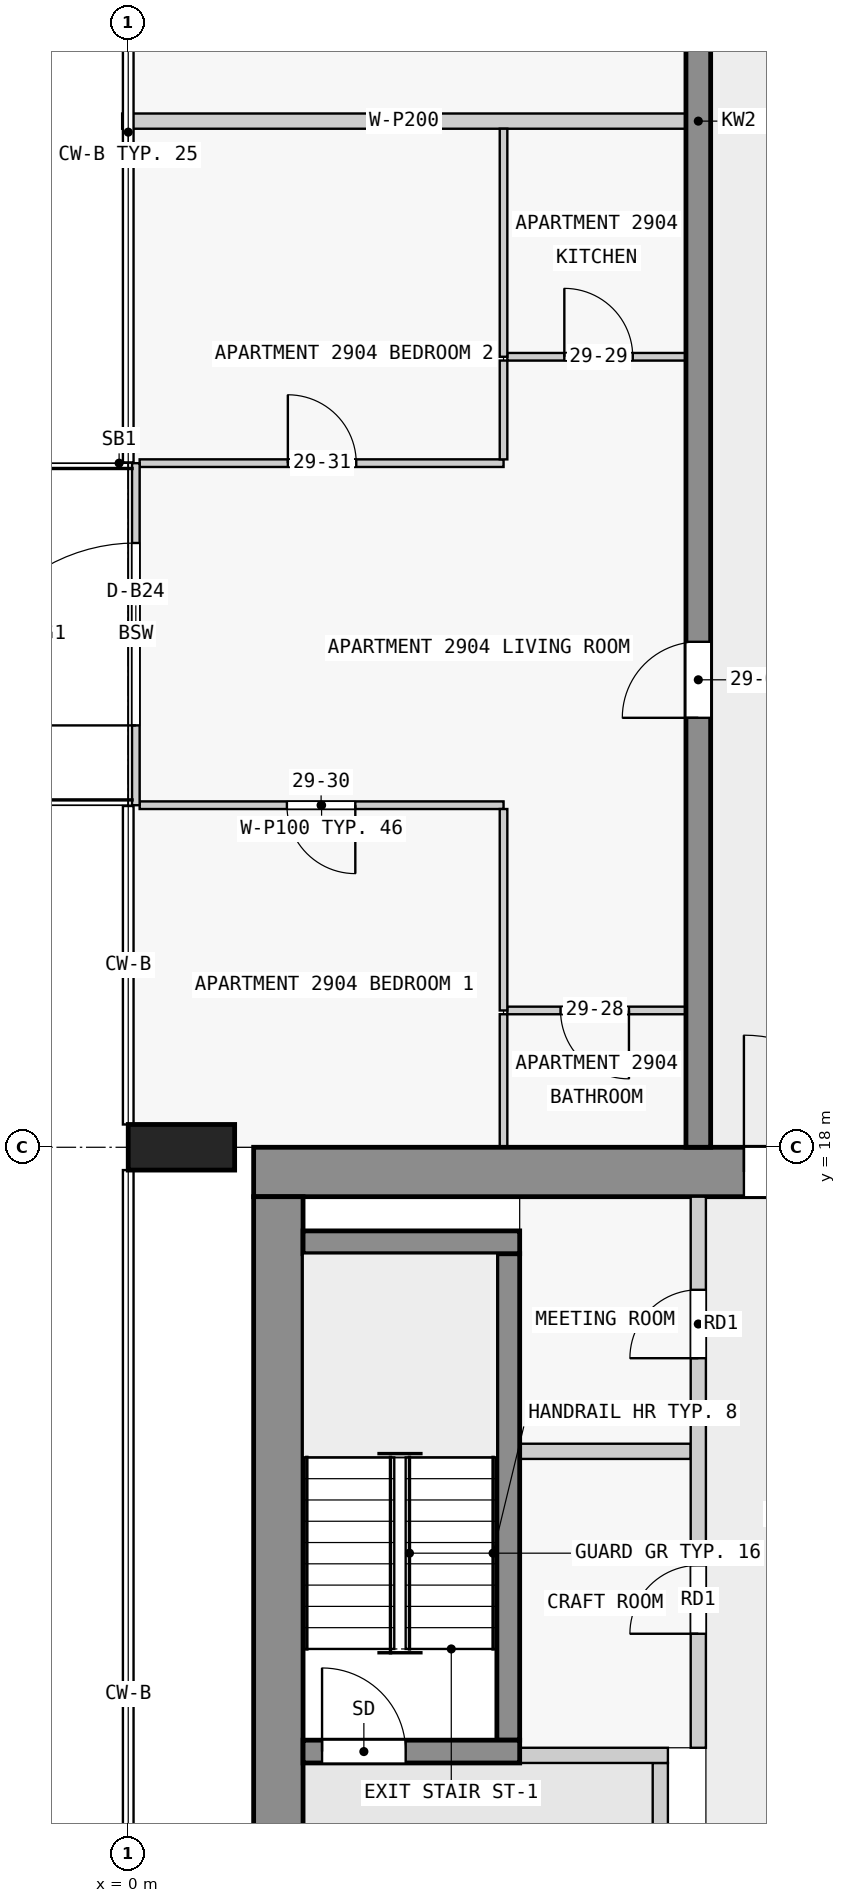
"""IFC4 building model, lengths in metres.
Left out: names, types, materials, properties, quantities, classifications, styles, units other than length and angle.
Written with IfcOpenShell. Run it as: python <this file> out.ifc"""

import sys

from ifc_helpers import new_model, si_unit, direction, frame, frame_2d, origin, origin_2d, place, context, subcontext, project, spatial, rectangle, extrude, element, fill, save


model = new_model("IFC4")
c1 = context("Model", 3, precision=1e-05, world=origin(), true_north=direction((0.0, 1.0)))
c2 = subcontext(c1, "Body", "Model", "MODEL_VIEW")
j1 = project(units=[si_unit("LENGTHUNIT", "METRE"), si_unit("PLANEANGLEUNIT", "RADIAN")], contexts=[c1])
p1 = place(None, origin())
s1 = spatial("IfcSite", under=j1, at=p1, CompositionType="ELEMENT")
p2 = place(p1, origin())
s2 = spatial("IfcBuilding", under=s1, at=p2, CompositionType="ELEMENT")
p3 = place(p2, frame((0.0, 0.0, 113.3)))
s3 = spatial("IfcBuildingStorey", under=s2, at=p3, CompositionType="ELEMENT", Elevation=113.3)
p4 = place(p3, frame((0.7, 18.0, 0.0), z_axis=(0.0, 0.0, 1.0), x_axis=(0.0, 1.0, 0.0)))
e1 = element("IfcColumn", 1, at=p4, inside=s3, PredefinedType="COLUMN", context=c2, shape_type="SweptSolid", body=[
    extrude(rectangle(XDim=0.6, YDim=1.4, at=origin_2d()), origin(), (0.0, 0.0, 1.0), 3.5),
])
p5 = place(p3, frame((1.65, 17.675, 0.0), z_axis=(0.0, 0.0, 1.0), x_axis=(1.0, 0.0, 0.0)))
e2 = element("IfcWall", 2, at=p5, inside=s3, PredefinedType="SHEAR", context=c2, shape_type="SweptSolid", body=[
    extrude(rectangle(XDim=20.85, YDim=0.65, at=frame_2d((10.425, 0.0))), origin(), (0.0, 0.0, 1.0), 3.25),
])
p6 = place(p5, frame((6.45, 0.0, 0.0)))
e3 = element("IfcOpeningElement", 3, at=p6, cuts=e2, PredefinedType="OPENING", context=c2, shape_type="SweptSolid", body=[
    extrude(rectangle(XDim=1.8, YDim=2.1, at=frame_2d((0.9, 1.05))), frame((0.0, 0.335, 0.0), z_axis=(0.0, -1.0, 0.0), x_axis=(1.0, 0.0, 0.0)), (0.0, 0.0, 1.0), 0.67),
])
p7 = place(p3, frame((1.975, 2.5, 0.0), z_axis=(0.0, 0.0, 1.0), x_axis=(0.0, 1.0, 0.0)))
e4 = element("IfcWall", 4, at=p7, inside=s3, PredefinedType="SHEAR", context=c2, shape_type="SweptSolid", body=[
    extrude(rectangle(XDim=14.85, YDim=0.65, at=frame_2d((7.425, 0.0))), origin(), (0.0, 0.0, 1.0), 3.25),
])
p8 = place(p3, frame((2.3, 10.05, 0.0), z_axis=(0.0, 0.0, 1.0), x_axis=(1.0, 0.0, 0.0)))
e5 = element("IfcWall", 5, at=p8, inside=s3, PredefinedType="SHEAR", context=c2, shape_type="SweptSolid", body=[
    extrude(rectangle(XDim=2.85, YDim=0.3, at=frame_2d((1.425, 0.0))), origin(), (0.0, 0.0, 1.0), 3.25),
])
p9 = place(p8, frame((0.25, 0.0, 0.0)))
e6 = element("IfcOpeningElement", 6, at=p9, cuts=e5, PredefinedType="OPENING", context=c2, shape_type="SweptSolid", body=[
    extrude(rectangle(XDim=1.1, YDim=2.1, at=frame_2d((0.55, 1.05))), frame((0.0, 0.16, 0.0), z_axis=(0.0, -1.0, 0.0), x_axis=(1.0, 0.0, 0.0)), (0.0, 0.0, 1.0), 0.32),
])
p10 = place(p3, frame((5.0, 10.2, 0.0), z_axis=(0.0, 0.0, 1.0), x_axis=(0.0, 1.0, 0.0)))
e7 = element("IfcWall", 7, at=p10, inside=s3, PredefinedType="SHEAR", context=c2, shape_type="SweptSolid", body=[
    extrude(rectangle(XDim=6.4, YDim=0.3, at=frame_2d((3.2, 0.0))), origin(), (0.0, 0.0, 1.0), 3.25),
])
p11 = place(p3, frame((2.3, 16.75, 0.0), z_axis=(0.0, 0.0, 1.0), x_axis=(1.0, 0.0, 0.0)))
e8 = element("IfcWall", 8, at=p11, inside=s3, PredefinedType="SHEAR", context=c2, shape_type="SweptSolid", body=[
    extrude(rectangle(XDim=2.85, YDim=0.3, at=frame_2d((1.425, 0.0))), origin(), (0.0, 0.0, 1.0), 3.25),
])
p12 = place(p3, frame((7.5, 18.0, 0.0), z_axis=(0.0, 0.0, 1.0), x_axis=(0.0, 1.0, 0.0)))
e9 = element("IfcWall", 9, at=p12, inside=s3, PredefinedType="SHEAR", context=c2, shape_type="SweptSolid", body=[
    extrude(rectangle(XDim=27.0, YDim=0.325, at=frame_2d((13.5, 0.0))), origin(), (0.0, 0.0, 1.0), 3.25),
])
p13 = place(p12, frame((5.65, 0.0, 0.0)))
e10 = element("IfcOpeningElement", 10, at=p13, cuts=e9, PredefinedType="OPENING", context=c2, shape_type="SweptSolid", body=[
    extrude(rectangle(XDim=1.0, YDim=2.1, at=frame_2d((0.5, 1.05))), frame((0.0, 0.172, 0.0), z_axis=(0.0, -1.0, 0.0), x_axis=(1.0, 0.0, 0.0)), (0.0, 0.0, 1.0), 0.345),
])
p14 = place(p12, frame((15.35, 0.0, 0.0)))
e11 = element("IfcOpeningElement", 11, at=p14, cuts=e9, PredefinedType="OPENING", context=c2, shape_type="SweptSolid", body=[
    extrude(rectangle(XDim=0.9, YDim=2.1, at=frame_2d((0.45, 1.05))), frame((0.0, 0.172, 0.0), z_axis=(0.0, -1.0, 0.0), x_axis=(1.0, 0.0, 0.0)), (0.0, 0.0, 1.0), 0.345),
])
p15 = place(p12, frame((21.35, 0.0, 0.0)))
e12 = element("IfcOpeningElement", 12, at=p15, cuts=e9, PredefinedType="OPENING", context=c2, shape_type="SweptSolid", body=[
    extrude(rectangle(XDim=1.0, YDim=2.1, at=frame_2d((0.5, 1.05))), frame((0.0, 0.172, 0.0), z_axis=(0.0, -1.0, 0.0), x_axis=(1.0, 0.0, 0.0)), (0.0, 0.0, 1.0), 0.345),
])
p16 = place(p3, frame((0.1, 22.5, 0.0), z_axis=(0.0, 0.0, 1.0), x_axis=(0.0, 1.0, 0.0)))
e13 = element("IfcWall", 13, at=p16, inside=s3, PredefinedType="STANDARD", context=c2, shape_type="SweptSolid", body=[
    extrude(rectangle(XDim=4.5, YDim=0.1, at=frame_2d((2.25, 0.0))), origin(), (0.0, 0.0, 1.0), 3.25),
])
p17 = place(p16, frame((1.05, 0.0, 0.0)))
e14 = element("IfcOpeningElement", 14, at=p17, cuts=e13, PredefinedType="OPENING", context=c2, shape_type="SweptSolid", body=[
    extrude(rectangle(XDim=2.4, YDim=2.4, at=frame_2d((1.2, 1.2))), frame((0.0, 0.06, 0.0), z_axis=(0.0, -1.0, 0.0), x_axis=(1.0, 0.0, 0.0)), (0.0, 0.0, 1.0), 0.12),
])
p18 = place(p3, frame((7.0, 5.9, 0.0), z_axis=(0.0, 0.0, 1.0), x_axis=(0.0, 1.0, 0.0)))
e15 = element("IfcWall", 15, at=p18, inside=s3, PredefinedType="PARTITIONING", context=c2, shape_type="SweptSolid", body=[
    extrude(rectangle(XDim=4.0, YDim=0.2, at=frame_2d((2.0, 0.0))), origin(), (0.0, 0.0, 1.0), 3.25),
])
p19 = place(p18, frame((0.45, 0.0, 0.0)))
e16 = element("IfcOpeningElement", 16, at=p19, cuts=e15, PredefinedType="OPENING", context=c2, shape_type="SweptSolid", body=[
    extrude(rectangle(XDim=1.1, YDim=2.1, at=frame_2d((0.55, 1.05))), frame((0.0, 0.11, 0.0), z_axis=(0.0, -1.0, 0.0), x_axis=(1.0, 0.0, 0.0)), (0.0, 0.0, 1.0), 0.22),
])
p20 = place(p3, frame((5.15, 10.0, 0.0), z_axis=(0.0, 0.0, 1.0), x_axis=(1.0, 0.0, 0.0)))
e17 = element("IfcWall", 17, at=p20, inside=s3, PredefinedType="PARTITIONING", context=c2, shape_type="SweptSolid", body=[
    extrude(rectangle(XDim=1.95, YDim=0.2, at=frame_2d((0.975, 0.0))), origin(), (0.0, 0.0, 1.0), 3.25),
])
p21 = place(p3, frame((7.5, 10.1, 0.0), z_axis=(0.0, 0.0, 1.0), x_axis=(0.0, 1.0, 0.0)))
e18 = element("IfcWall", 18, at=p21, inside=s3, PredefinedType="PARTITIONING", context=c2, shape_type="SweptSolid", body=[
    extrude(rectangle(XDim=7.25, YDim=0.2, at=frame_2d((3.625, 0.0))), origin(), (0.0, 0.0, 1.0), 3.25),
])
p22 = place(p21, frame((1.5, 0.0, 0.0)))
e19 = element("IfcOpeningElement", 19, at=p22, cuts=e18, PredefinedType="OPENING", context=c2, shape_type="SweptSolid", body=[
    extrude(rectangle(XDim=0.9, YDim=2.1, at=frame_2d((0.45, 1.05))), frame((0.0, 0.11, 0.0), z_axis=(0.0, -1.0, 0.0), x_axis=(1.0, 0.0, 0.0)), (0.0, 0.0, 1.0), 0.22),
])
p23 = place(p21, frame((5.125, 0.0, 0.0)))
e20 = element("IfcOpeningElement", 20, at=p23, cuts=e18, PredefinedType="OPENING", context=c2, shape_type="SweptSolid", body=[
    extrude(rectangle(XDim=0.9, YDim=2.1, at=frame_2d((0.45, 1.05))), frame((0.0, 0.11, 0.0), z_axis=(0.0, -1.0, 0.0), x_axis=(1.0, 0.0, 0.0)), (0.0, 0.0, 1.0), 0.22),
])
p24 = place(p3, frame((5.15, 14.0, 0.0), z_axis=(0.0, 0.0, 1.0), x_axis=(1.0, 0.0, 0.0)))
e21 = element("IfcWall", 21, at=p24, inside=s3, PredefinedType="PARTITIONING", context=c2, shape_type="SweptSolid", body=[
    extrude(rectangle(XDim=2.25, YDim=0.2, at=frame_2d((1.125, 0.0))), origin(), (0.0, 0.0, 1.0), 3.25),
])
p25 = place(p3, frame((7.337, 19.8, 0.0), z_axis=(0.0, 0.0, 1.0), x_axis=(-1.0, 0.0, 0.0)))
e22 = element("IfcWall", 22, at=p25, inside=s3, PredefinedType="PARTITIONING", context=c2, shape_type="SweptSolid", body=[
    extrude(rectangle(XDim=2.35, YDim=0.1, at=frame_2d((1.175, 0.0))), origin(), (0.0, 0.0, 1.0), 3.25),
])
p26 = place(p25, frame((0.75, 0.0, 0.0)))
e23 = element("IfcOpeningElement", 23, at=p26, cuts=e22, PredefinedType="OPENING", context=c2, shape_type="SweptSolid", body=[
    extrude(rectangle(XDim=0.9, YDim=2.1, at=frame_2d((0.45, 1.05))), frame((0.0, 0.06, 0.0), z_axis=(0.0, -1.0, 0.0), x_axis=(1.0, 0.0, 0.0)), (0.0, 0.0, 1.0), 0.12),
])
p27 = place(p3, frame((4.938, 22.5, 0.0), z_axis=(0.0, 0.0, 1.0), x_axis=(-1.0, 0.0, 0.0)))
e24 = element("IfcWall", 24, at=p27, inside=s3, PredefinedType="PARTITIONING", context=c2, shape_type="SweptSolid", body=[
    extrude(rectangle(XDim=4.788, YDim=0.1, at=frame_2d((2.394, 0.0))), origin(), (0.0, 0.0, 1.0), 3.25),
])
p28 = place(p27, frame((1.95, 0.0, 0.0)))
e25 = element("IfcOpeningElement", 25, at=p28, cuts=e24, PredefinedType="OPENING", context=c2, shape_type="SweptSolid", body=[
    extrude(rectangle(XDim=0.9, YDim=2.1, at=frame_2d((0.45, 1.05))), frame((0.0, 0.06, 0.0), z_axis=(0.0, -1.0, 0.0), x_axis=(1.0, 0.0, 0.0)), (0.0, 0.0, 1.0), 0.12),
])
p29 = place(p3, frame((0.15, 27.0, 0.0), z_axis=(0.0, 0.0, 1.0), x_axis=(1.0, 0.0, 0.0)))
e26 = element("IfcWall", 26, at=p29, inside=s3, PredefinedType="PARTITIONING", context=c2, shape_type="SweptSolid", body=[
    extrude(rectangle(XDim=4.788, YDim=0.1, at=frame_2d((2.394, 0.0))), origin(), (0.0, 0.0, 1.0), 3.25),
])
p30 = place(p29, frame((1.95, 0.0, 0.0)))
e27 = element("IfcOpeningElement", 27, at=p30, cuts=e26, PredefinedType="OPENING", context=c2, shape_type="SweptSolid", body=[
    extrude(rectangle(XDim=0.9, YDim=2.1, at=frame_2d((0.45, 1.05))), frame((0.0, 0.06, 0.0), z_axis=(0.0, -1.0, 0.0), x_axis=(1.0, 0.0, 0.0)), (0.0, 0.0, 1.0), 0.12),
])
p31 = place(p3, frame((4.988, 28.4, 0.0), z_axis=(0.0, 0.0, 1.0), x_axis=(1.0, 0.0, 0.0)))
e28 = element("IfcWall", 28, at=p31, inside=s3, PredefinedType="PARTITIONING", context=c2, shape_type="SweptSolid", body=[
    extrude(rectangle(XDim=2.35, YDim=0.1, at=frame_2d((1.175, 0.0))), origin(), (0.0, 0.0, 1.0), 3.25),
])
p32 = place(p31, frame((0.75, 0.0, 0.0)))
e29 = element("IfcOpeningElement", 29, at=p32, cuts=e28, PredefinedType="OPENING", context=c2, shape_type="SweptSolid", body=[
    extrude(rectangle(XDim=0.9, YDim=2.1, at=frame_2d((0.45, 1.05))), frame((0.0, 0.06, 0.0), z_axis=(0.0, -1.0, 0.0), x_axis=(1.0, 0.0, 0.0)), (0.0, 0.0, 1.0), 0.12),
])
p33 = place(p3, frame((7.337, 31.5, 0.0), z_axis=(0.0, 0.0, 1.0), x_axis=(-1.0, 0.0, 0.0)))
e30 = element("IfcWall", 30, at=p33, inside=s3, PredefinedType="PARTITIONING", context=c2, shape_type="SweptSolid", body=[
    extrude(rectangle(XDim=7.417, YDim=0.2, at=frame_2d((3.709, 0.0))), origin(), (0.0, 0.0, 1.0), 3.25),
])
p34 = place(p3, frame((4.938, 19.75, 0.0), z_axis=(0.0, 0.0, 1.0), x_axis=(0.0, -1.0, 0.0)))
e31 = element("IfcWall", 31, at=p34, inside=s3, PredefinedType="PARTITIONING", context=c2, shape_type="SweptSolid", body=[
    extrude(rectangle(XDim=1.75, YDim=0.1, at=frame_2d((0.875, 0.0))), origin(), (0.0, 0.0, 1.0), 3.25),
])
p35 = place(p3, frame((4.938, 31.4, 0.0), z_axis=(0.0, 0.0, 1.0), x_axis=(0.0, -1.0, 0.0)))
e32 = element("IfcWall", 32, at=p35, inside=s3, PredefinedType="PARTITIONING", context=c2, shape_type="SweptSolid", body=[
    extrude(rectangle(XDim=3.0, YDim=0.1, at=frame_2d((1.5, 0.0))), origin(), (0.0, 0.0, 1.0), 3.25),
])
p36 = place(p3, frame((4.938, 19.8, 0.0), z_axis=(0.0, 0.0, 1.0), x_axis=(0.0, 1.0, 0.0)))
e33 = element("IfcWall", 33, at=p36, inside=s3, PredefinedType="PARTITIONING", context=c2, shape_type="SweptSolid", body=[
    extrude(rectangle(XDim=2.65, YDim=0.1, at=frame_2d((1.325, 0.0))), origin(), (0.0, 0.0, 1.0), 3.25),
])
p37 = place(p3, frame((4.938, 27.05, 0.0), z_axis=(0.0, 0.0, 1.0), x_axis=(0.0, 1.0, 0.0)))
e34 = element("IfcWall", 34, at=p37, inside=s3, PredefinedType="PARTITIONING", context=c2, shape_type="SweptSolid", body=[
    extrude(rectangle(XDim=1.3, YDim=0.1, at=frame_2d((0.65, 0.0))), origin(), (0.0, 0.0, 1.0), 3.25),
])
p38 = place(p17, origin())
e35 = element("IfcDoor", 35, at=p38, inside=s3, OperationType="SINGLE_SWING_LEFT", PredefinedType="DOOR", context=c2, shape_type="SweptSolid", body=[
    extrude(rectangle(XDim=2.4, YDim=2.4, at=frame_2d((1.2, 1.2))), frame((0.0, 0.025, 0.0), z_axis=(0.0, -1.0, 0.0), x_axis=(1.0, 0.0, 0.0)), (0.0, 0.0, 1.0), 0.05),
])
fill(e14, e35)
p39 = place(p9, origin())
e36 = element("IfcDoor", 36, at=p39, inside=s3, OperationType="SINGLE_SWING_RIGHT", PredefinedType="DOOR", context=c2, shape_type="SweptSolid", body=[
    extrude(rectangle(XDim=1.1, YDim=2.1, at=frame_2d((0.55, 1.05))), frame((0.0, 0.025, 0.0), z_axis=(0.0, -1.0, 0.0), x_axis=(1.0, 0.0, 0.0)), (0.0, 0.0, 1.0), 0.05),
])
fill(e6, e36)
p40 = place(p6, origin())
e37 = element("IfcDoor", 37, at=p40, inside=s3, OperationType="DOUBLE_DOOR_SINGLE_SWING", PredefinedType="DOOR", context=c2, shape_type="SweptSolid", body=[
    extrude(rectangle(XDim=1.8, YDim=2.1, at=frame_2d((0.9, 1.05))), frame((0.0, 0.025, 0.0), z_axis=(0.0, -1.0, 0.0), x_axis=(1.0, 0.0, 0.0)), (0.0, 0.0, 1.0), 0.05),
])
fill(e3, e37)
p41 = place(p22, origin())
e38 = element("IfcDoor", 38, at=p41, inside=s3, OperationType="SINGLE_SWING_RIGHT", PredefinedType="DOOR", context=c2, shape_type="SweptSolid", body=[
    extrude(rectangle(XDim=0.9, YDim=2.1, at=frame_2d((0.45, 1.05))), frame((0.0, 0.025, 0.0), z_axis=(0.0, -1.0, 0.0), x_axis=(1.0, 0.0, 0.0)), (0.0, 0.0, 1.0), 0.05),
])
fill(e19, e38)
p42 = place(p23, origin())
e39 = element("IfcDoor", 39, at=p42, inside=s3, OperationType="SINGLE_SWING_RIGHT", PredefinedType="DOOR", context=c2, shape_type="SweptSolid", body=[
    extrude(rectangle(XDim=0.9, YDim=2.1, at=frame_2d((0.45, 1.05))), frame((0.0, 0.025, 0.0), z_axis=(0.0, -1.0, 0.0), x_axis=(1.0, 0.0, 0.0)), (0.0, 0.0, 1.0), 0.05),
])
fill(e20, e39)
p43 = place(p13, origin())
e40 = element("IfcDoor", 40, at=p43, inside=s3, OperationType="SINGLE_SWING_LEFT", PredefinedType="DOOR", context=c2, shape_type="SweptSolid", body=[
    extrude(rectangle(XDim=1.0, YDim=2.1, at=frame_2d((0.5, 1.05))), frame((0.0, 0.025, 0.0), z_axis=(0.0, -1.0, 0.0), x_axis=(1.0, 0.0, 0.0)), (0.0, 0.0, 1.0), 0.05),
])
fill(e10, e40)
p44 = place(p26, origin())
e41 = element("IfcDoor", 41, at=p44, inside=s3, OperationType="SINGLE_SWING_RIGHT", PredefinedType="DOOR", context=c2, shape_type="SweptSolid", body=[
    extrude(rectangle(XDim=0.9, YDim=2.1, at=frame_2d((0.45, 1.05))), frame((0.0, 0.025, 0.0), z_axis=(0.0, -1.0, 0.0), x_axis=(1.0, 0.0, 0.0)), (0.0, 0.0, 1.0), 0.05),
])
fill(e23, e41)
p45 = place(p32, origin())
e42 = element("IfcDoor", 42, at=p45, inside=s3, OperationType="SINGLE_SWING_RIGHT", PredefinedType="DOOR", context=c2, shape_type="SweptSolid", body=[
    extrude(rectangle(XDim=0.9, YDim=2.1, at=frame_2d((0.45, 1.05))), frame((0.0, 0.025, 0.0), z_axis=(0.0, -1.0, 0.0), x_axis=(1.0, 0.0, 0.0)), (0.0, 0.0, 1.0), 0.05),
])
fill(e29, e42)
p46 = place(p28, origin())
e43 = element("IfcDoor", 43, at=p46, inside=s3, OperationType="SINGLE_SWING_RIGHT", PredefinedType="DOOR", context=c2, shape_type="SweptSolid", body=[
    extrude(rectangle(XDim=0.9, YDim=2.1, at=frame_2d((0.45, 1.05))), frame((0.0, 0.025, 0.0), z_axis=(0.0, -1.0, 0.0), x_axis=(1.0, 0.0, 0.0)), (0.0, 0.0, 1.0), 0.05),
])
fill(e25, e43)
p47 = place(p30, origin())
e44 = element("IfcDoor", 44, at=p47, inside=s3, OperationType="SINGLE_SWING_RIGHT", PredefinedType="DOOR", context=c2, shape_type="SweptSolid", body=[
    extrude(rectangle(XDim=0.9, YDim=2.1, at=frame_2d((0.45, 1.05))), frame((0.0, 0.025, 0.0), z_axis=(0.0, -1.0, 0.0), x_axis=(1.0, 0.0, 0.0)), (0.0, 0.0, 1.0), 0.05),
])
fill(e27, e44)
save(model, sys.argv[1])
